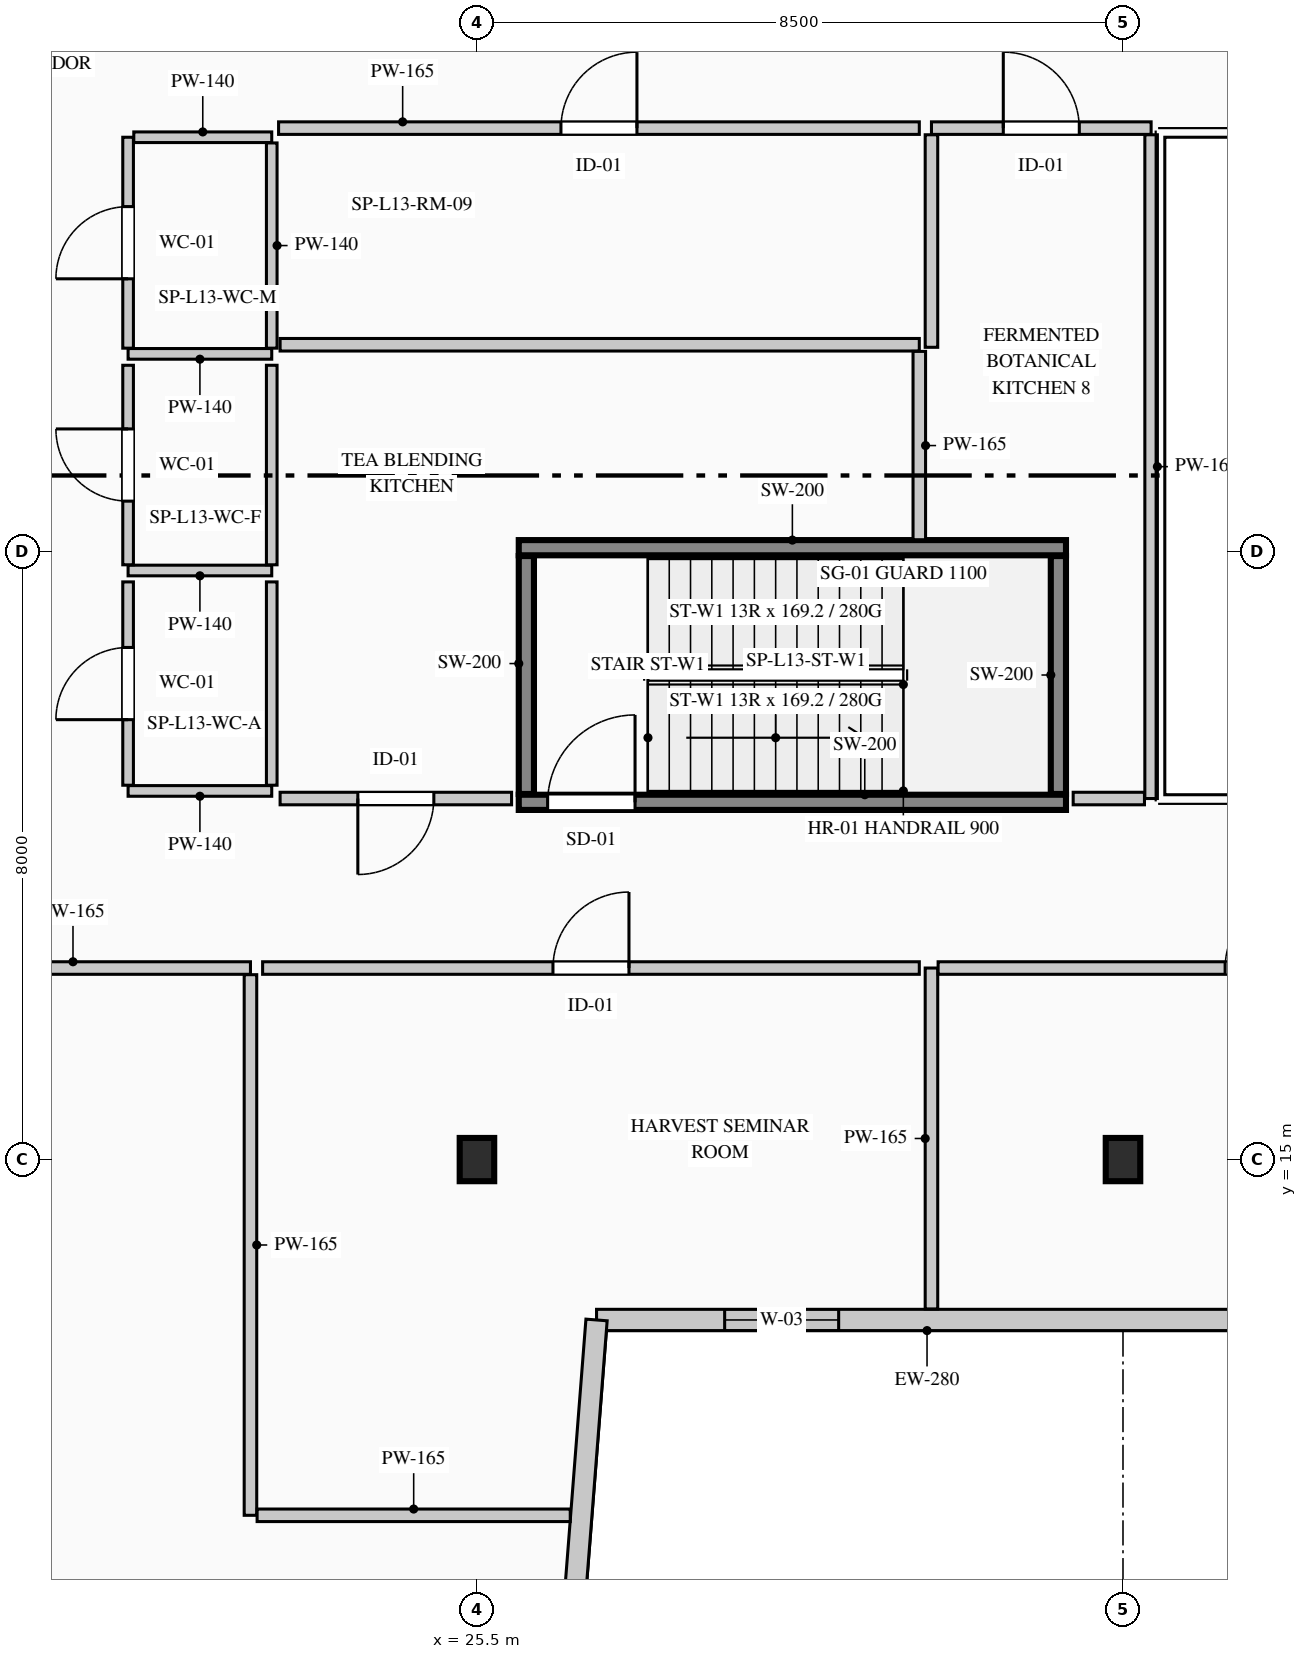
"""IFC4 building model, lengths in metres.
Left out: names, types, materials, properties, quantities, classifications, styles, units other than length and angle.
Written with IfcOpenShell. Run it as: python <this file> out.ifc"""

import sys

from ifc_helpers import new_model, si_unit, direction, frame, frame_2d, origin, origin_2d, place, context, subcontext, project, spatial, rectangle, i_section, extrude, element, fill, save


model = new_model("IFC4")
c1 = context("Model", 3, precision=1e-05, world=origin(), true_north=direction((0.0, 1.0)))
c2 = subcontext(c1, "Body", "Model", "MODEL_VIEW")
j1 = project(units=[si_unit("LENGTHUNIT", "METRE"), si_unit("PLANEANGLEUNIT", "RADIAN")], contexts=[c1])
p1 = place(None, origin())
s1 = spatial("IfcSite", under=j1, at=p1, CompositionType="ELEMENT")
p2 = place(p1, origin())
s2 = spatial("IfcBuilding", under=s1, at=p2, CompositionType="ELEMENT")
p3 = place(p2, frame((0.0, 0.0, 57.8)))
s3 = spatial("IfcBuildingStorey", under=s2, at=p3, CompositionType="ELEMENT", Elevation=57.8)
p4 = place(p3, frame((26.05, 19.7, 0.0), z_axis=(0.0, 0.0, 1.0), x_axis=(1.0, 0.0, 0.0)))
e1 = element("IfcWall", 1, at=p4, inside=s3, PredefinedType="SHEAR", context=c2, shape_type="SweptSolid", body=[
    extrude(rectangle(XDim=7.2, YDim=0.2, at=frame_2d((3.6, 0.0))), origin(), (0.0, 0.0, 1.0), 4.4),
])
p5 = place(p4, frame((0.38, 0.0, 0.0)))
e2 = element("IfcOpeningElement", 2, at=p5, cuts=e1, PredefinedType="OPENING", context=c2, shape_type="SweptSolid", body=[
    extrude(rectangle(XDim=1.15, YDim=2.2, at=frame_2d((0.575, 1.1))), frame((0.0, 0.11, 0.0), z_axis=(0.0, -1.0, 0.0), x_axis=(1.0, 0.0, 0.0)), (0.0, 0.0, 1.0), 0.22),
])
p6 = place(p3, frame((26.05, 23.05, 0.0), z_axis=(0.0, 0.0, 1.0), x_axis=(1.0, 0.0, 0.0)))
e3 = element("IfcWall", 3, at=p6, inside=s3, PredefinedType="SHEAR", context=c2, shape_type="SweptSolid", body=[
    extrude(rectangle(XDim=7.2, YDim=0.2, at=frame_2d((3.6, 0.0))), origin(), (0.0, 0.0, 1.0), 4.4),
])
for number, where, z_axis, x_axis in (
    (4, (26.15, 19.81, 0.0), (0.0, 0.0, 1.0), (0.0, 1.0, 0.0)),
    (5, (33.15, 19.81, 0.0), (0.0, 0.0, 1.0), (0.0, 1.0, 0.0)),
):
    element("IfcWall", number, at=place(p3, frame(where, z_axis=z_axis, x_axis=x_axis)), inside=s3, PredefinedType="SHEAR", context=c2, shape_type="SweptSolid", body=[
        extrude(rectangle(XDim=3.13, YDim=0.2, at=frame_2d((1.565, 0.0))), origin(), (0.0, 0.0, 1.0), 4.4),
    ])
for number, where, z_axis, x_axis in (
    (6, (25.5, 15.0, 0.0), (0.0, 0.0, 1.0), (1.0, 0.0, 0.0)),
    (7, (34.0, 15.0, 0.0), (0.0, 0.0, 1.0), (1.0, 0.0, 0.0)),
):
    element("IfcColumn", number, at=place(p3, frame(where, z_axis=z_axis, x_axis=x_axis)), inside=s3, PredefinedType="COLUMN", context=c2, shape_type="SweptSolid", body=[
        extrude(i_section(OverallWidth=0.454, OverallDepth=0.569, WebThickness=0.078, FlangeThickness=0.08, FilletRadius=0.015, at=origin_2d()), origin(), (0.0, 0.0, 1.0), 4.4),
    ])
p7 = place(p3, frame((35.77, 12.89, 0.0), z_axis=(0.0, 0.0, 1.0), x_axis=(-1.0, 0.0, 0.0)))
e8 = element("IfcWall", 8, at=p7, inside=s3, PredefinedType="STANDARD", context=c2, shape_type="SweptSolid", body=[
    extrude(rectangle(XDim=8.697, YDim=0.28, at=frame_2d((4.348, 0.0))), origin(), (0.0, 0.0, 1.0), 4.1),
])
p8 = place(p7, frame((5.511, 0.0, 0.9)))
e9 = element("IfcOpeningElement", 9, at=p8, cuts=e8, PredefinedType="OPENING", context=c2, shape_type="SweptSolid", body=[
    extrude(rectangle(XDim=1.5, YDim=1.8, at=frame_2d((0.75, 0.9))), frame((0.0, 0.15, 0.0), z_axis=(0.0, -1.0, 0.0), x_axis=(1.0, 0.0, 0.0)), (0.0, 0.0, 1.0), 0.3),
])
p9 = place(p3, frame((27.073, 12.89, 0.0), z_axis=(0.0, 0.0, 1.0), x_axis=(-0.077816860153, -0.996967670627, 0.0)))
e10 = element("IfcWall", 10, at=p9, inside=s3, PredefinedType="STANDARD", context=c2, shape_type="SweptSolid", body=[
    extrude(rectangle(XDim=10.281, YDim=0.28, at=frame_2d((5.141, 0.0))), origin(), (0.0, 0.0, 1.0), 4.1),
])
p10 = place(p3, frame((22.8, 25.6, 0.0), z_axis=(0.0, 0.0, 1.0), x_axis=(-1.0, 0.0, 0.0)))
e11 = element("IfcWall", 11, at=p10, inside=s3, PredefinedType="PARTITIONING", context=c2, shape_type="SweptSolid", body=[
    extrude(rectangle(XDim=1.89, YDim=0.14, at=frame_2d((0.945, 0.0))), origin(), (0.0, 0.0, 1.0), 4.1),
])
p11 = place(p3, frame((20.91, 25.675, 0.0), z_axis=(0.0, 0.0, 1.0), x_axis=(0.0, 1.0, 0.0)))
e12 = element("IfcWall", 12, at=p11, inside=s3, PredefinedType="PARTITIONING", context=c2, shape_type="SweptSolid", body=[
    extrude(rectangle(XDim=2.775, YDim=0.14, at=frame_2d((1.387, 0.0))), origin(), (0.0, 0.0, 1.0), 4.1),
])
p12 = place(p11, frame((0.913, 0.0, 0.0)))
e13 = element("IfcOpeningElement", 13, at=p12, cuts=e12, PredefinedType="OPENING", context=c2, shape_type="SweptSolid", body=[
    extrude(rectangle(XDim=0.95, YDim=2.15, at=frame_2d((0.475, 1.075))), frame((0.0, 0.08, 0.0), z_axis=(0.0, -1.0, 0.0), x_axis=(1.0, 0.0, 0.0)), (0.0, 0.0, 1.0), 0.16),
])
p13 = place(p3, frame((20.985, 28.45, 0.0), z_axis=(0.0, 0.0, 1.0), x_axis=(1.0, 0.0, 0.0)))
e14 = element("IfcWall", 14, at=p13, inside=s3, PredefinedType="PARTITIONING", context=c2, shape_type="SweptSolid", body=[
    extrude(rectangle(XDim=1.815, YDim=0.14, at=frame_2d((0.907, 0.0))), origin(), (0.0, 0.0, 1.0), 4.1),
])
p14 = place(p3, frame((22.8, 28.375, 0.0), z_axis=(0.0, 0.0, 1.0), x_axis=(0.0, -1.0, 0.0)))
e15 = element("IfcWall", 15, at=p14, inside=s3, PredefinedType="PARTITIONING", context=c2, shape_type="SweptSolid", body=[
    extrude(rectangle(XDim=2.7, YDim=0.14, at=frame_2d((1.35, 0.0))), origin(), (0.0, 0.0, 1.0), 3.685),
])
p15 = place(p3, frame((22.8, 22.75, 0.0), z_axis=(0.0, 0.0, 1.0), x_axis=(-1.0, 0.0, 0.0)))
e16 = element("IfcWall", 16, at=p15, inside=s3, PredefinedType="PARTITIONING", context=c2, shape_type="SweptSolid", body=[
    extrude(rectangle(XDim=1.89, YDim=0.14, at=frame_2d((0.945, 0.0))), origin(), (0.0, 0.0, 1.0), 4.1),
])
p16 = place(p3, frame((20.91, 22.825, 0.0), z_axis=(0.0, 0.0, 1.0), x_axis=(0.0, 1.0, 0.0)))
e17 = element("IfcWall", 17, at=p16, inside=s3, PredefinedType="PARTITIONING", context=c2, shape_type="SweptSolid", body=[
    extrude(rectangle(XDim=2.625, YDim=0.14, at=frame_2d((1.312, 0.0))), origin(), (0.0, 0.0, 1.0), 4.1),
])
p17 = place(p16, frame((0.837, 0.0, 0.0)))
e18 = element("IfcOpeningElement", 18, at=p17, cuts=e17, PredefinedType="OPENING", context=c2, shape_type="SweptSolid", body=[
    extrude(rectangle(XDim=0.95, YDim=2.15, at=frame_2d((0.475, 1.075))), frame((0.0, 0.08, 0.0), z_axis=(0.0, -1.0, 0.0), x_axis=(1.0, 0.0, 0.0)), (0.0, 0.0, 1.0), 0.16),
])
p18 = place(p3, frame((22.8, 25.45, 0.0), z_axis=(0.0, 0.0, 1.0), x_axis=(0.0, -1.0, 0.0)))
e19 = element("IfcWall", 19, at=p18, inside=s3, PredefinedType="PARTITIONING", context=c2, shape_type="SweptSolid", body=[
    extrude(rectangle(XDim=2.625, YDim=0.14, at=frame_2d((1.312, 0.0))), origin(), (0.0, 0.0, 1.0), 3.685),
])
p19 = place(p3, frame((22.8, 19.85, 0.0), z_axis=(0.0, 0.0, 1.0), x_axis=(-1.0, 0.0, 0.0)))
e20 = element("IfcWall", 20, at=p19, inside=s3, PredefinedType="PARTITIONING", context=c2, shape_type="SweptSolid", body=[
    extrude(rectangle(XDim=1.89, YDim=0.14, at=frame_2d((0.945, 0.0))), origin(), (0.0, 0.0, 1.0), 4.1),
])
p20 = place(p3, frame((20.91, 19.925, 0.0), z_axis=(0.0, 0.0, 1.0), x_axis=(0.0, 1.0, 0.0)))
e21 = element("IfcWall", 21, at=p20, inside=s3, PredefinedType="PARTITIONING", context=c2, shape_type="SweptSolid", body=[
    extrude(rectangle(XDim=2.675, YDim=0.14, at=frame_2d((1.337, 0.0))), origin(), (0.0, 0.0, 1.0), 4.1),
])
p21 = place(p20, frame((0.863, 0.0, 0.0)))
e22 = element("IfcOpeningElement", 22, at=p21, cuts=e21, PredefinedType="OPENING", context=c2, shape_type="SweptSolid", body=[
    extrude(rectangle(XDim=0.95, YDim=2.15, at=frame_2d((0.475, 1.075))), frame((0.0, 0.08, 0.0), z_axis=(0.0, -1.0, 0.0), x_axis=(1.0, 0.0, 0.0)), (0.0, 0.0, 1.0), 0.16),
])
p22 = place(p3, frame((22.8, 22.6, 0.0), z_axis=(0.0, 0.0, 1.0), x_axis=(0.0, -1.0, 0.0)))
e23 = element("IfcWall", 23, at=p22, inside=s3, PredefinedType="PARTITIONING", context=c2, shape_type="SweptSolid", body=[
    extrude(rectangle(XDim=2.675, YDim=0.14, at=frame_2d((1.337, 0.0))), origin(), (0.0, 0.0, 1.0), 3.685),
])
p23 = place(p3, frame((11.28, 17.52, 0.0), z_axis=(0.0, 0.0, 1.0), x_axis=(1.0, 0.0, 0.0)))
e24 = element("IfcWall", 24, at=p23, inside=s3, PredefinedType="PARTITIONING", context=c2, shape_type="SweptSolid", body=[
    extrude(rectangle(XDim=11.24, YDim=0.165, at=frame_2d((5.62, 0.0))), origin(), (0.0, 0.0, 1.0), 4.1),
])
p24 = place(p23, frame((5.12, 0.0, 0.0)))
e25 = element("IfcOpeningElement", 25, at=p24, cuts=e24, PredefinedType="OPENING", context=c2, shape_type="SweptSolid", body=[
    extrude(rectangle(XDim=1.0, YDim=2.15, at=frame_2d((0.5, 1.075))), frame((0.0, 0.093, 0.0), z_axis=(0.0, -1.0, 0.0), x_axis=(1.0, 0.0, 0.0)), (0.0, 0.0, 1.0), 0.185),
])
p25 = place(p3, frame((22.52, 17.433, 0.0), z_axis=(0.0, 0.0, 1.0), x_axis=(0.0, -1.0, 0.0)))
e26 = element("IfcWall", 26, at=p25, inside=s3, PredefinedType="PARTITIONING", context=c2, shape_type="SweptSolid", body=[
    extrude(rectangle(XDim=7.113, YDim=0.165, at=frame_2d((3.556, 0.0))), origin(), (0.0, 0.0, 1.0), 3.685),
])
p26 = place(p3, frame((22.607, 10.32, 0.0), z_axis=(0.0, 0.0, 1.0), x_axis=(1.0, 0.0, 0.0)))
e27 = element("IfcWall", 27, at=p26, inside=s3, PredefinedType="PARTITIONING", context=c2, shape_type="SweptSolid", body=[
    extrude(rectangle(XDim=4.12, YDim=0.165, at=frame_2d((2.06, 0.0))), origin(), (0.0, 0.0, 1.0), 4.1),
])
p27 = place(p3, frame((31.48, 13.035, 0.0), z_axis=(0.0, 0.0, 1.0), x_axis=(0.0, 1.0, 0.0)))
e28 = element("IfcWall", 28, at=p27, inside=s3, PredefinedType="PARTITIONING", context=c2, shape_type="SweptSolid", body=[
    extrude(rectangle(XDim=4.485, YDim=0.165, at=frame_2d((2.243, 0.0))), origin(), (0.0, 0.0, 1.0), 4.1),
])
p28 = place(p3, frame((31.567, 17.52, 0.0), z_axis=(0.0, 0.0, 1.0), x_axis=(1.0, 0.0, 0.0)))
e29 = element("IfcWall", 29, at=p28, inside=s3, PredefinedType="PARTITIONING", context=c2, shape_type="SweptSolid", body=[
    extrude(rectangle(XDim=8.553, YDim=0.165, at=frame_2d((4.276, 0.0))), origin(), (0.0, 0.0, 1.0), 3.685),
])
p29 = place(p28, frame((3.776, 0.0, 0.0)))
e30 = element("IfcOpeningElement", 30, at=p29, cuts=e29, PredefinedType="OPENING", context=c2, shape_type="SweptSolid", body=[
    extrude(rectangle(XDim=1.0, YDim=2.15, at=frame_2d((0.5, 1.075))), frame((0.0, 0.093, 0.0), z_axis=(0.0, -1.0, 0.0), x_axis=(1.0, 0.0, 0.0)), (0.0, 0.0, 1.0), 0.185),
])
p30 = place(p3, frame((22.68, 17.52, 0.0), z_axis=(0.0, 0.0, 1.0), x_axis=(1.0, 0.0, 0.0)))
e31 = element("IfcWall", 31, at=p30, inside=s3, PredefinedType="PARTITIONING", context=c2, shape_type="SweptSolid", body=[
    extrude(rectangle(XDim=8.64, YDim=0.165, at=frame_2d((4.32, 0.0))), origin(), (0.0, 0.0, 1.0), 3.685),
])
p31 = place(p30, frame((3.82, 0.0, 0.0)))
e32 = element("IfcOpeningElement", 32, at=p31, cuts=e31, PredefinedType="OPENING", context=c2, shape_type="SweptSolid", body=[
    extrude(rectangle(XDim=1.0, YDim=2.15, at=frame_2d((0.5, 1.075))), frame((0.0, 0.093, 0.0), z_axis=(0.0, -1.0, 0.0), x_axis=(1.0, 0.0, 0.0)), (0.0, 0.0, 1.0), 0.185),
])
p32 = place(p3, frame((25.956, 19.75, 0.0), z_axis=(0.0, 0.0, 1.0), x_axis=(-1.0, 0.0, 0.0)))
e33 = element("IfcWall", 33, at=p32, inside=s3, PredefinedType="PARTITIONING", context=c2, shape_type="SweptSolid", body=[
    extrude(rectangle(XDim=3.046, YDim=0.165, at=frame_2d((1.523, 0.0))), origin(), (0.0, 0.0, 1.0), 4.1),
])
p33 = place(p32, frame((1.023, 0.0, 0.0)))
e34 = element("IfcOpeningElement", 34, at=p33, cuts=e33, PredefinedType="OPENING", context=c2, shape_type="SweptSolid", body=[
    extrude(rectangle(XDim=1.0, YDim=2.15, at=frame_2d((0.5, 1.075))), frame((0.0, 0.093, 0.0), z_axis=(0.0, -1.0, 0.0), x_axis=(1.0, 0.0, 0.0)), (0.0, 0.0, 1.0), 0.185),
])
p34 = place(p3, frame((22.91, 25.72, 0.0), z_axis=(0.0, 0.0, 1.0), x_axis=(1.0, 0.0, 0.0)))
e35 = element("IfcWall", 35, at=p34, inside=s3, PredefinedType="PARTITIONING", context=c2, shape_type="SweptSolid", body=[
    extrude(rectangle(XDim=8.41, YDim=0.165, at=frame_2d((4.205, 0.0))), origin(), (0.0, 0.0, 1.0), 3.685),
])
p35 = place(p3, frame((31.32, 25.633, 0.0), z_axis=(0.0, 0.0, 1.0), x_axis=(0.0, -1.0, 0.0)))
e36 = element("IfcWall", 36, at=p35, inside=s3, PredefinedType="PARTITIONING", context=c2, shape_type="SweptSolid", body=[
    extrude(rectangle(XDim=2.478, YDim=0.165, at=frame_2d((1.239, 0.0))), origin(), (0.0, 0.0, 1.0), 4.1),
])
p36 = place(p3, frame((31.48, 28.57, 0.0), z_axis=(0.0, 0.0, 1.0), x_axis=(1.0, 0.0, 0.0)))
e37 = element("IfcWall", 37, at=p36, inside=s3, PredefinedType="PARTITIONING", context=c2, shape_type="SweptSolid", body=[
    extrude(rectangle(XDim=2.89, YDim=0.165, at=frame_2d((1.445, 0.0))), origin(), (0.0, 0.0, 1.0), 3.685),
])
p37 = place(p36, frame((0.945, 0.0, 0.0)))
e38 = element("IfcOpeningElement", 38, at=p37, cuts=e37, PredefinedType="OPENING", context=c2, shape_type="SweptSolid", body=[
    extrude(rectangle(XDim=1.0, YDim=2.15, at=frame_2d((0.5, 1.075))), frame((0.0, 0.093, 0.0), z_axis=(0.0, -1.0, 0.0), x_axis=(1.0, 0.0, 0.0)), (0.0, 0.0, 1.0), 0.185),
])
p38 = place(p3, frame((34.37, 28.482, 0.0), z_axis=(0.0, 0.0, 1.0), x_axis=(0.0, -1.0, 0.0)))
e39 = element("IfcWall", 39, at=p38, inside=s3, PredefinedType="PARTITIONING", context=c2, shape_type="SweptSolid", body=[
    extrude(rectangle(XDim=8.732, YDim=0.165, at=frame_2d((4.366, 0.0))), origin(), (0.0, 0.0, 1.0), 4.1),
])
p39 = place(p3, frame((34.282, 19.75, 0.0), z_axis=(0.0, 0.0, 1.0), x_axis=(-1.0, 0.0, 0.0)))
e40 = element("IfcWall", 40, at=p39, inside=s3, PredefinedType="PARTITIONING", context=c2, shape_type="SweptSolid", body=[
    extrude(rectangle(XDim=0.938, YDim=0.165, at=frame_2d((0.469, 0.0))), origin(), (0.0, 0.0, 1.0), 4.1),
])
p40 = place(p3, frame((31.48, 25.686, 0.0), z_axis=(0.0, 0.0, 1.0), x_axis=(0.0, 1.0, 0.0)))
e41 = element("IfcWall", 41, at=p40, inside=s3, PredefinedType="PARTITIONING", context=c2, shape_type="SweptSolid", body=[
    extrude(rectangle(XDim=2.796, YDim=0.165, at=frame_2d((1.398, 0.0))), origin(), (0.0, 0.0, 1.0), 4.1),
])
p41 = place(p3, frame((22.89, 28.57, 0.0), z_axis=(0.0, 0.0, 1.0), x_axis=(1.0, 0.0, 0.0)))
e42 = element("IfcWall", 42, at=p41, inside=s3, PredefinedType="PARTITIONING", context=c2, shape_type="SweptSolid", body=[
    extrude(rectangle(XDim=8.43, YDim=0.165, at=frame_2d((4.215, 0.0))), origin(), (0.0, 0.0, 1.0), 3.685),
])
p42 = place(p41, frame((3.715, 0.0, 0.0)))
e43 = element("IfcOpeningElement", 43, at=p42, cuts=e42, PredefinedType="OPENING", context=c2, shape_type="SweptSolid", body=[
    extrude(rectangle(XDim=1.0, YDim=2.15, at=frame_2d((0.5, 1.075))), frame((0.0, 0.093, 0.0), z_axis=(0.0, -1.0, 0.0), x_axis=(1.0, 0.0, 0.0)), (0.0, 0.0, 1.0), 0.185),
])
p43 = place(p8, origin())
e44 = element("IfcWindow", 44, at=p43, inside=s3, PartitioningType="SINGLE_PANEL", PredefinedType="WINDOW", context=c2, shape_type="SweptSolid", body=[
    extrude(rectangle(XDim=1.5, YDim=1.8, at=frame_2d((0.75, 0.9))), frame((0.0, 0.03, 0.0), z_axis=(0.0, -1.0, 0.0), x_axis=(1.0, 0.0, 0.0)), (0.0, 0.0, 1.0), 0.06),
])
fill(e9, e44)
p44 = place(p5, origin())
e45 = element("IfcDoor", 45, at=p44, inside=s3, OperationType="SINGLE_SWING_RIGHT", PredefinedType="DOOR", context=c2, shape_type="SweptSolid", body=[
    extrude(rectangle(XDim=1.15, YDim=2.2, at=frame_2d((0.575, 1.1))), frame((0.0, 0.025, 0.0), z_axis=(0.0, -1.0, 0.0), x_axis=(1.0, 0.0, 0.0)), (0.0, 0.0, 1.0), 0.05),
])
fill(e2, e45)
p45 = place(p12, origin())
e46 = element("IfcDoor", 46, at=p45, inside=s3, OperationType="SINGLE_SWING_LEFT", PredefinedType="DOOR", context=c2, shape_type="SweptSolid", body=[
    extrude(rectangle(XDim=0.95, YDim=2.15, at=frame_2d((0.475, 1.075))), frame((0.0, 0.025, 0.0), z_axis=(0.0, -1.0, 0.0), x_axis=(1.0, 0.0, 0.0)), (0.0, 0.0, 1.0), 0.05),
])
fill(e13, e46)
p46 = place(p17, origin())
e47 = element("IfcDoor", 47, at=p46, inside=s3, OperationType="SINGLE_SWING_RIGHT", PredefinedType="DOOR", context=c2, shape_type="SweptSolid", body=[
    extrude(rectangle(XDim=0.95, YDim=2.15, at=frame_2d((0.475, 1.075))), frame((0.0, 0.025, 0.0), z_axis=(0.0, -1.0, 0.0), x_axis=(1.0, 0.0, 0.0)), (0.0, 0.0, 1.0), 0.05),
])
fill(e18, e47)
p47 = place(p21, origin())
e48 = element("IfcDoor", 48, at=p47, inside=s3, OperationType="SINGLE_SWING_LEFT", PredefinedType="DOOR", context=c2, shape_type="SweptSolid", body=[
    extrude(rectangle(XDim=0.95, YDim=2.15, at=frame_2d((0.475, 1.075))), frame((0.0, 0.025, 0.0), z_axis=(0.0, -1.0, 0.0), x_axis=(1.0, 0.0, 0.0)), (0.0, 0.0, 1.0), 0.05),
])
fill(e22, e48)
p48 = place(p29, origin())
e49 = element("IfcDoor", 49, at=p48, inside=s3, OperationType="SINGLE_SWING_RIGHT", PredefinedType="DOOR", context=c2, shape_type="SweptSolid", body=[
    extrude(rectangle(XDim=1.0, YDim=2.15, at=frame_2d((0.5, 1.075))), frame((0.0, 0.025, 0.0), z_axis=(0.0, -1.0, 0.0), x_axis=(1.0, 0.0, 0.0)), (0.0, 0.0, 1.0), 0.05),
])
fill(e30, e49)
p49 = place(p31, origin())
e50 = element("IfcDoor", 50, at=p49, inside=s3, OperationType="SINGLE_SWING_RIGHT", PredefinedType="DOOR", context=c2, shape_type="SweptSolid", body=[
    extrude(rectangle(XDim=1.0, YDim=2.15, at=frame_2d((0.5, 1.075))), frame((0.0, 0.025, 0.0), z_axis=(0.0, -1.0, 0.0), x_axis=(1.0, 0.0, 0.0)), (0.0, 0.0, 1.0), 0.05),
])
fill(e32, e50)
p50 = place(p33, origin())
e51 = element("IfcDoor", 51, at=p50, inside=s3, OperationType="SINGLE_SWING_RIGHT", PredefinedType="DOOR", context=c2, shape_type="SweptSolid", body=[
    extrude(rectangle(XDim=1.0, YDim=2.15, at=frame_2d((0.5, 1.075))), frame((0.0, 0.025, 0.0), z_axis=(0.0, -1.0, 0.0), x_axis=(1.0, 0.0, 0.0)), (0.0, 0.0, 1.0), 0.05),
])
fill(e34, e51)
p51 = place(p37, origin())
e52 = element("IfcDoor", 52, at=p51, inside=s3, OperationType="SINGLE_SWING_LEFT", PredefinedType="DOOR", context=c2, shape_type="SweptSolid", body=[
    extrude(rectangle(XDim=1.0, YDim=2.15, at=frame_2d((0.5, 1.075))), frame((0.0, 0.025, 0.0), z_axis=(0.0, -1.0, 0.0), x_axis=(1.0, 0.0, 0.0)), (0.0, 0.0, 1.0), 0.05),
])
fill(e38, e52)
p52 = place(p42, origin())
e53 = element("IfcDoor", 53, at=p52, inside=s3, OperationType="SINGLE_SWING_RIGHT", PredefinedType="DOOR", context=c2, shape_type="SweptSolid", body=[
    extrude(rectangle(XDim=1.0, YDim=2.15, at=frame_2d((0.5, 1.075))), frame((0.0, 0.025, 0.0), z_axis=(0.0, -1.0, 0.0), x_axis=(1.0, 0.0, 0.0)), (0.0, 0.0, 1.0), 0.05),
])
fill(e43, e53)
save(model, sys.argv[1])
